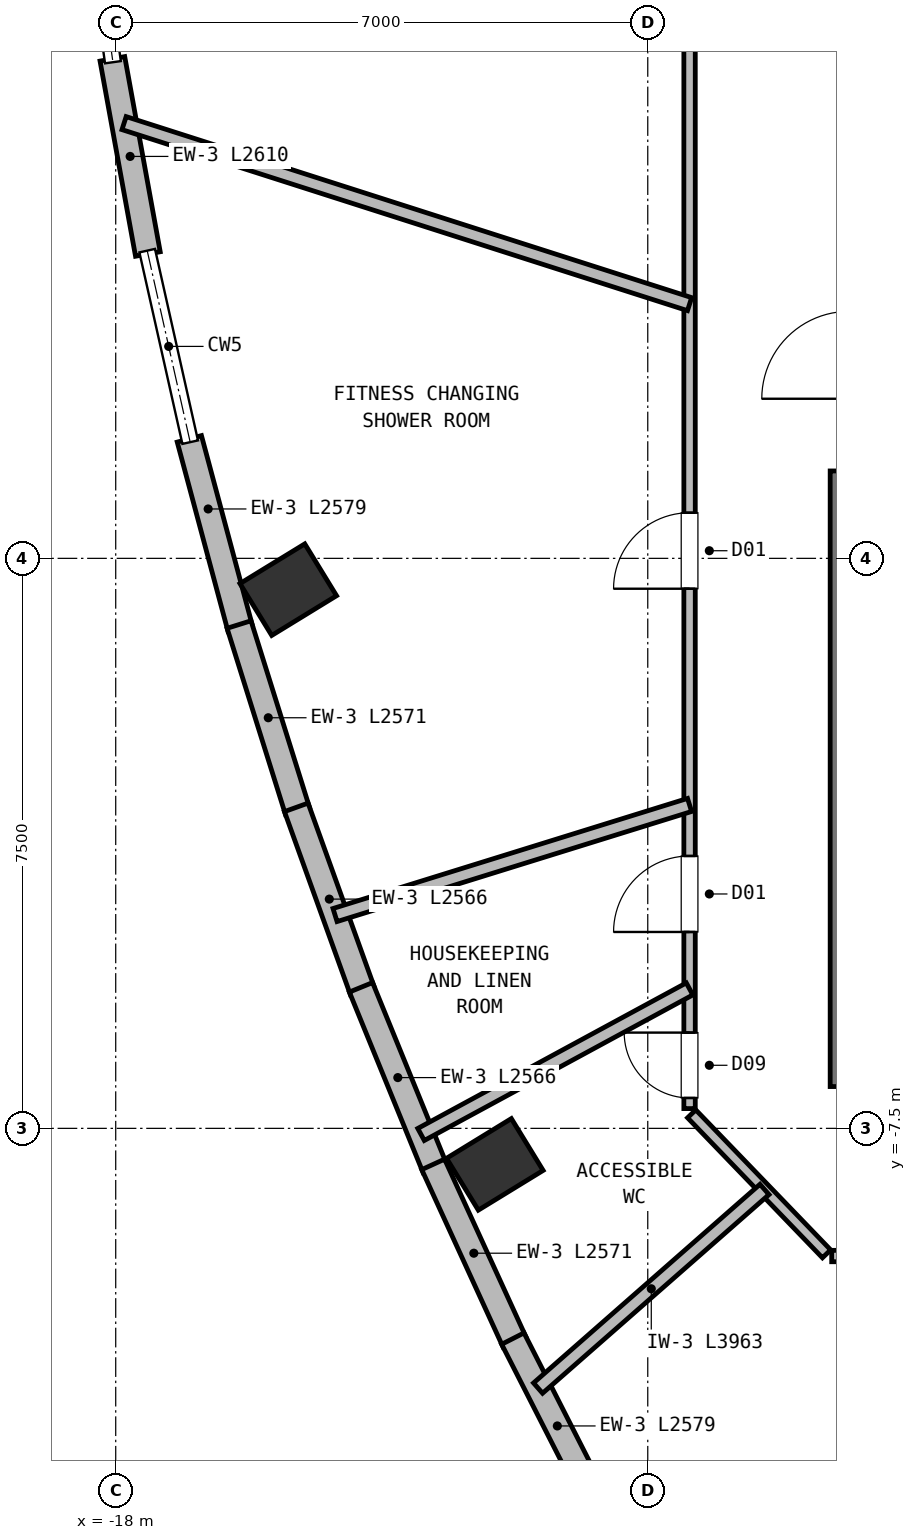
"""IFC4 building model, lengths in metres.
Left out: names, types, materials, properties, quantities, classifications, styles, units other than length and angle.
Written with IfcOpenShell. Run it as: python <this file> out.ifc"""

import sys

from ifc_helpers import new_model, si_unit, direction, frame, frame_2d, origin, origin_2d, place, context, subcontext, project, spatial, rectangle, extrude, element, fill, save


model = new_model("IFC4")
c1 = context("Model", 3, precision=1e-05, world=origin(), true_north=direction((0.0, 1.0)))
c2 = subcontext(c1, "Body", "Model", "MODEL_VIEW")
j1 = project(units=[si_unit("LENGTHUNIT", "METRE"), si_unit("PLANEANGLEUNIT", "RADIAN")], contexts=[c1])
p1 = place(None, origin())
s1 = spatial("IfcSite", under=j1, at=p1, CompositionType="ELEMENT")
p2 = place(p1, origin())
s2 = spatial("IfcBuilding", under=s1, at=p2, CompositionType="ELEMENT")
p3 = place(p2, frame((0.0, 0.0, 178.25)))
s3 = spatial("IfcBuildingStorey", under=s2, at=p3, CompositionType="ELEMENT", Elevation=178.25)
p4 = place(p3, frame((-8.35, -6.95, 0.0), z_axis=(0.0, 0.0, 1.0), x_axis=(0.0, 1.0, 0.0)))
e1 = element("IfcWall", 1, at=p4, inside=s3, PredefinedType="SHEAR", context=c2, shape_type="SweptSolid", body=[
    extrude(rectangle(XDim=8.1, YDim=0.5, at=frame_2d((4.05, 0.0))), origin(), (0.0, 0.0, 1.0), 4.25),
])
for number, where, z_axis, x_axis in (
    (2, (-15.73, -0.412, 0.0), (0.0, 0.0, 1.0), (-0.522, 0.853, 0.0)),
    (3, (-13.012, -7.974, 0.0), (0.0, 0.0, 1.0), (-0.522, 0.853, 0.0)),
):
    element("IfcColumn", number, at=place(p3, frame(where, z_axis=z_axis, x_axis=x_axis)), inside=s3, PredefinedType="COLUMN", context=c2, shape_type="SweptSolid", body=[
        extrude(rectangle(XDim=0.8, YDim=1.0, at=origin_2d()), origin(), (0.0, 0.0, 1.0), 4.5),
    ])
p5 = place(p3, frame((-17.577, 4.005, 0.0), z_axis=(0.0, 0.0, 1.0), x_axis=(-0.178943058868, 0.983859431872, 0.0)))
e4 = element("IfcWall", 4, at=p5, inside=s3, PredefinedType="SOLIDWALL", context=c2, shape_type="SweptSolid", body=[
    extrude(rectangle(XDim=2.61, YDim=0.33, at=frame_2d((1.305, 0.0))), origin(), (0.0, 0.0, 1.0), 4.25),
])
p6 = place(p3, frame((-16.363, -0.919, 0.0), z_axis=(0.0, 0.0, 1.0), x_axis=(-0.258982112339, 0.965882117801, 0.0)))
e5 = element("IfcWall", 5, at=p6, inside=s3, PredefinedType="SOLIDWALL", context=c2, shape_type="SweptSolid", body=[
    extrude(rectangle(XDim=2.579, YDim=0.33, at=frame_2d((1.29, 0.0))), origin(), (0.0, 0.0, 1.0), 4.25),
])
p7 = place(p3, frame((-15.608, -3.324, 0.0), z_axis=(0.0, 0.0, 1.0), x_axis=(-0.299080665224, 0.954227832171, 0.0)))
e6 = element("IfcWall", 6, at=p7, inside=s3, PredefinedType="SOLIDWALL", context=c2, shape_type="SweptSolid", body=[
    extrude(rectangle(XDim=2.571, YDim=0.33, at=frame_2d((1.285, 0.0))), origin(), (0.0, 0.0, 1.0), 4.25),
])
p8 = place(p3, frame((-14.755, -5.691, 0.0), z_axis=(0.0, 0.0, 1.0), x_axis=(-0.338685779509, 0.940899539142, 0.0)))
e7 = element("IfcWall", 7, at=p8, inside=s3, PredefinedType="SOLIDWALL", context=c2, shape_type="SweptSolid", body=[
    extrude(rectangle(XDim=2.566, YDim=0.33, at=frame_2d((1.283, 0.0))), origin(), (0.0, 0.0, 1.0), 4.25),
])
p9 = place(p3, frame((-13.804, -8.02, 0.0), z_axis=(0.0, 0.0, 1.0), x_axis=(-0.377828752797, 0.925875495712, 0.0)))
e8 = element("IfcWall", 8, at=p9, inside=s3, PredefinedType="SOLIDWALL", context=c2, shape_type="SweptSolid", body=[
    extrude(rectangle(XDim=2.566, YDim=0.33, at=frame_2d((1.283, 0.0))), origin(), (0.0, 0.0, 1.0), 4.25),
])
p10 = place(p3, frame((-12.753, -10.311, 0.0), z_axis=(0.0, 0.0, 1.0), x_axis=(-0.416291659672, 0.909231133479, 0.0)))
e9 = element("IfcWall", 9, at=p10, inside=s3, PredefinedType="SOLIDWALL", context=c2, shape_type="SweptSolid", body=[
    extrude(rectangle(XDim=2.571, YDim=0.33, at=frame_2d((1.285, 0.0))), origin(), (0.0, 0.0, 1.0), 4.25),
])
p11 = place(p3, frame((-11.604, -12.565, 0.0), z_axis=(0.0, 0.0, 1.0), x_axis=(-0.453789648634, 0.891108834426, 0.0)))
e10 = element("IfcWall", 10, at=p11, inside=s3, PredefinedType="SOLIDWALL", context=c2, shape_type="SweptSolid", body=[
    extrude(rectangle(XDim=2.579, YDim=0.33, at=frame_2d((1.29, 0.0))), origin(), (0.0, 0.0, 1.0), 4.25),
])
p12 = place(p3, frame((8.58, -9.18, 0.0), z_axis=(0.0, 0.0, 1.0), x_axis=(-1.0, 0.0, 0.0)))
e11 = element("IfcWall", 11, at=p12, inside=s3, PredefinedType="PARTITIONING", context=c2, shape_type="SweptSolid", body=[
    extrude(rectangle(XDim=17.16, YDim=0.15, at=frame_2d((8.58, 0.0))), origin(), (0.0, 0.0, 1.0), 3.93),
])
p13 = place(p12, frame((10.436, 0.0, 0.0)))
e12 = element("IfcOpeningElement", 12, at=p13, cuts=e11, PredefinedType="OPENING", context=c2, shape_type="SweptSolid", body=[
    extrude(rectangle(XDim=1.0, YDim=2.15, at=frame_2d((0.5, 1.075))), frame((0.0, 0.085, 0.0), z_axis=(0.0, -1.0, 0.0), x_axis=(1.0, 0.0, 0.0)), (0.0, 0.0, 1.0), 0.17),
])
p14 = place(p3, frame((-10.45, -7.24, 0.0), z_axis=(0.0, 0.0, 1.0), x_axis=(0.0, 1.0, 0.0)))
e13 = element("IfcWall", 13, at=p14, inside=s3, PredefinedType="PARTITIONING", context=c2, shape_type="SweptSolid", body=[
    extrude(rectangle(XDim=14.48, YDim=0.15, at=frame_2d((7.24, 0.0))), origin(), (0.0, 0.0, 1.0), 3.93),
])
p15 = place(p14, frame((0.14, 0.0, 0.0)))
e14 = element("IfcOpeningElement", 14, at=p15, cuts=e13, PredefinedType="OPENING", context=c2, shape_type="SweptSolid", body=[
    extrude(rectangle(XDim=0.86, YDim=2.05, at=frame_2d((0.43, 1.025))), frame((0.0, 0.085, 0.0), z_axis=(0.0, -1.0, 0.0), x_axis=(1.0, 0.0, 0.0)), (0.0, 0.0, 1.0), 0.17),
])
p16 = place(p14, frame((2.324, 0.0, 0.0)))
e15 = element("IfcOpeningElement", 15, at=p16, cuts=e13, PredefinedType="OPENING", context=c2, shape_type="SweptSolid", body=[
    extrude(rectangle(XDim=1.0, YDim=2.15, at=frame_2d((0.5, 1.075))), frame((0.0, 0.085, 0.0), z_axis=(0.0, -1.0, 0.0), x_axis=(1.0, 0.0, 0.0)), (0.0, 0.0, 1.0), 0.17),
])
p17 = place(p14, frame((6.84, 0.0, 0.0)))
e16 = element("IfcOpeningElement", 16, at=p17, cuts=e13, PredefinedType="OPENING", context=c2, shape_type="SweptSolid", body=[
    extrude(rectangle(XDim=1.0, YDim=2.15, at=frame_2d((0.5, 1.075))), frame((0.0, 0.085, 0.0), z_axis=(0.0, -1.0, 0.0), x_axis=(1.0, 0.0, 0.0)), (0.0, 0.0, 1.0), 0.17),
])
p18 = place(p3, frame((-8.648, -9.151, 0.0), z_axis=(0.0, 0.0, 1.0), x_axis=(-0.693764562202, 0.720201869085, 0.0)))
e17 = element("IfcWall", 17, at=p18, inside=s3, PredefinedType="PARTITIONING", context=c2, shape_type="SweptSolid", body=[
    extrude(rectangle(XDim=2.558, YDim=0.15, at=frame_2d((1.279, 0.0))), origin(), (0.0, 0.0, 1.0), 3.93),
])
p19 = place(p3, frame((-9.464, -8.304, 0.0), z_axis=(0.0, 0.0, 1.0), x_axis=(-0.75170982187, -0.659494005813, 0.0)))
e18 = element("IfcWall", 18, at=p19, inside=s3, PredefinedType="PARTITIONING", context=c2, shape_type="SweptSolid", body=[
    extrude(rectangle(XDim=3.963, YDim=0.18, at=frame_2d((1.982, 0.0))), origin(), (0.0, 0.0, 1.0), 4.25),
])
p20 = place(p3, frame((-10.45, 3.345, 0.0), z_axis=(0.0, 0.0, 1.0), x_axis=(-0.95239692853, 0.304860772365, 0.0)))
e19 = element("IfcWall", 19, at=p20, inside=s3, PredefinedType="PARTITIONING", context=c2, shape_type="SweptSolid", body=[
    extrude(rectangle(XDim=7.812, YDim=0.18, at=frame_2d((3.906, 0.0))), origin(), (0.0, 0.0, 1.0), 4.25),
])
p21 = place(p3, frame((-10.45, -3.245, 0.0), z_axis=(0.0, 0.0, 1.0), x_axis=(-0.955028022871, -0.296515556981, 0.0)))
e20 = element("IfcWall", 20, at=p21, inside=s3, PredefinedType="PARTITIONING", context=c2, shape_type="SweptSolid", body=[
    extrude(rectangle(XDim=4.884, YDim=0.18, at=frame_2d((2.442, 0.0))), origin(), (0.0, 0.0, 1.0), 4.25),
])
p22 = place(p3, frame((-10.45, -5.665, 0.0), z_axis=(0.0, 0.0, 1.0), x_axis=(-0.879150933039, -0.476543426077, 0.0)))
e21 = element("IfcWall", 21, at=p22, inside=s3, PredefinedType="PARTITIONING", context=c2, shape_type="SweptSolid", body=[
    extrude(rectangle(XDim=4.019, YDim=0.18, at=frame_2d((2.009, 0.0))), origin(), (0.0, 0.0, 1.0), 4.25),
])
p23 = place(p15, origin())
e22 = element("IfcDoor", 22, at=p23, inside=s3, OperationType="SINGLE_SWING_RIGHT", PredefinedType="DOOR", context=c2, shape_type="SweptSolid", body=[
    extrude(rectangle(XDim=0.86, YDim=2.05, at=frame_2d((0.43, 1.025))), frame((0.0, 0.025, 0.0), z_axis=(0.0, -1.0, 0.0), x_axis=(1.0, 0.0, 0.0)), (0.0, 0.0, 1.0), 0.05),
])
fill(e14, e22)
p24 = place(p16, origin())
e23 = element("IfcDoor", 23, at=p24, inside=s3, OperationType="SINGLE_SWING_LEFT", PredefinedType="DOOR", context=c2, shape_type="SweptSolid", body=[
    extrude(rectangle(XDim=1.0, YDim=2.15, at=frame_2d((0.5, 1.075))), frame((0.0, 0.025, 0.0), z_axis=(0.0, -1.0, 0.0), x_axis=(1.0, 0.0, 0.0)), (0.0, 0.0, 1.0), 0.05),
])
fill(e15, e23)
p25 = place(p17, origin())
e24 = element("IfcDoor", 24, at=p25, inside=s3, OperationType="SINGLE_SWING_LEFT", PredefinedType="DOOR", context=c2, shape_type="SweptSolid", body=[
    extrude(rectangle(XDim=1.0, YDim=2.15, at=frame_2d((0.5, 1.075))), frame((0.0, 0.025, 0.0), z_axis=(0.0, -1.0, 0.0), x_axis=(1.0, 0.0, 0.0)), (0.0, 0.0, 1.0), 0.05),
])
fill(e16, e24)
save(model, sys.argv[1])
